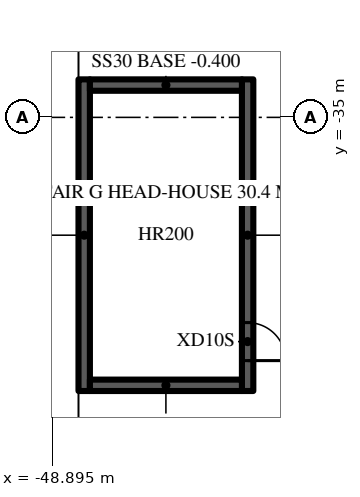
"""IFC4 building model, lengths in metres.
Left out: names, types, materials, properties, quantities, classifications, styles, units other than length and angle.
Written with IfcOpenShell. Run it as: python <this file> out.ifc"""

import sys

from ifc_helpers import new_model, si_unit, direction, frame, frame_2d, origin, place, context, subcontext, project, spatial, rectangle, extrude, element, fill, save


model = new_model("IFC4")
c1 = context("Model", 3, precision=1e-05, world=origin(), true_north=direction((0.0, 1.0)))
c2 = subcontext(c1, "Body", "Model", "MODEL_VIEW")
j1 = project(units=[si_unit("LENGTHUNIT", "METRE"), si_unit("PLANEANGLEUNIT", "RADIAN")], contexts=[c1])
p1 = place(None, origin())
s1 = spatial("IfcSite", under=j1, at=p1, CompositionType="ELEMENT")
p2 = place(p1, origin())
s2 = spatial("IfcBuilding", under=s1, at=p2, CompositionType="ELEMENT")
p3 = place(p2, origin())
s3 = spatial("IfcBuildingStorey", under=s2, at=p3, CompositionType="ELEMENT", Elevation=0.0)
p4 = place(p3, frame((-43.75, -42.2, -0.4), z_axis=(0.0, 0.0, 1.0), x_axis=(0.0, 1.0, 0.0)))
e1 = element("IfcWall", 1, at=p4, inside=s3, PredefinedType="SOLIDWALL", context=c2, shape_type="SweptSolid", body=[
    extrude(rectangle(XDim=8.2, YDim=0.3, at=frame_2d((4.1, 0.0))), origin(), (0.0, 0.0, 1.0), 3.6),
])
p5 = place(p4, frame((0.8, 0.0, 0.4)))
e2 = element("IfcOpeningElement", 2, at=p5, cuts=e1, PredefinedType="OPENING", context=c2, shape_type="SweptSolid", body=[
    extrude(rectangle(XDim=1.0, YDim=2.2, at=frame_2d((0.5, 1.1))), frame((0.0, 0.16, 0.0), z_axis=(0.0, -1.0, 0.0), x_axis=(1.0, 0.0, 0.0)), (0.0, 0.0, 1.0), 0.32),
])
p6 = place(p3, frame((-48.05, -34.0, -0.4), z_axis=(0.0, 0.0, 1.0), x_axis=(0.0, -1.0, 0.0)))
e3 = element("IfcWall", 3, at=p6, inside=s3, PredefinedType="SOLIDWALL", context=c2, shape_type="SweptSolid", body=[
    extrude(rectangle(XDim=8.2, YDim=0.3, at=frame_2d((4.1, 0.0))), origin(), (0.0, 0.0, 1.0), 3.6),
])
for number, where, z_axis, x_axis in (
    (4, (-43.9, -42.05, -0.4), (0.0, 0.0, 1.0), (-1.0, 0.0, 0.0)),
    (5, (-47.9, -34.15, -0.4), (0.0, 0.0, 1.0), (1.0, 0.0, 0.0)),
):
    element("IfcWall", number, at=place(p3, frame(where, z_axis=z_axis, x_axis=x_axis)), inside=s3, PredefinedType="SOLIDWALL", context=c2, shape_type="SweptSolid", body=[
        extrude(rectangle(XDim=4.0, YDim=0.3, at=frame_2d((2.0, 0.0))), origin(), (0.0, 0.0, 1.0), 3.6),
    ])
p7 = place(p5, frame((1.0, 0.0, 0.0), z_axis=(0.0, 0.0, 1.0), x_axis=(-1.0, 0.0, 0.0)))
e6 = element("IfcDoor", 6, at=p7, inside=s3, OperationType="SINGLE_SWING_RIGHT", PredefinedType="DOOR", context=c2, shape_type="SweptSolid", body=[
    extrude(rectangle(XDim=1.0, YDim=2.2, at=frame_2d((0.5, 1.1))), frame((0.0, 0.025, 0.0), z_axis=(0.0, -1.0, 0.0), x_axis=(1.0, 0.0, 0.0)), (0.0, 0.0, 1.0), 0.05),
])
fill(e2, e6)
save(model, sys.argv[1])
